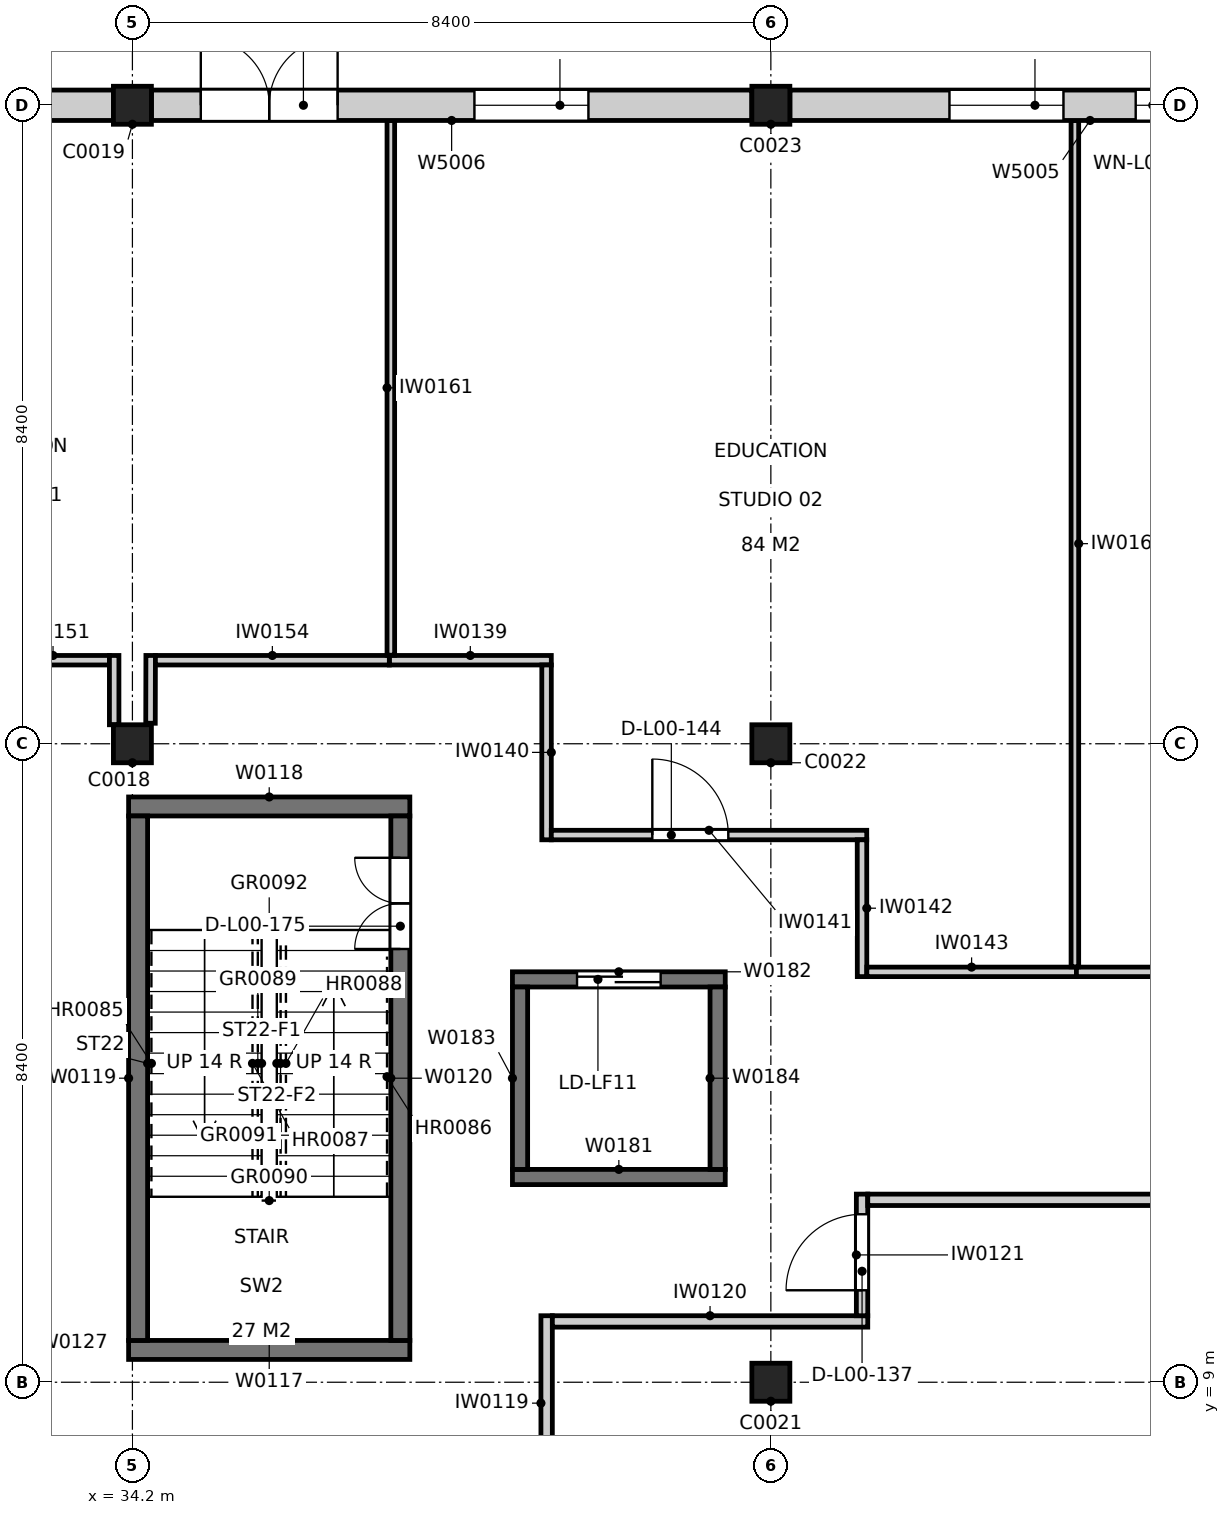
"""IFC4 building model, lengths in metres.
Left out: names, types, materials, properties, quantities, classifications, styles, units other than length and angle.
Written with IfcOpenShell. Run it as: python <this file> out.ifc"""

import sys

from ifc_helpers import new_model, si_unit, direction, frame, frame_2d, origin, origin_2d, place, context, subcontext, project, spatial, rectangle, extrude, element, fill, save


model = new_model("IFC4")
c1 = context("Model", 3, precision=1e-05, world=origin(), true_north=direction((0.0, 1.0)))
c2 = subcontext(c1, "Body", "Model", "MODEL_VIEW")
j1 = project(units=[si_unit("LENGTHUNIT", "METRE"), si_unit("PLANEANGLEUNIT", "RADIAN")], contexts=[c1])
p1 = place(None, origin())
s1 = spatial("IfcSite", under=j1, at=p1, CompositionType="ELEMENT")
p2 = place(p1, origin())
s2 = spatial("IfcBuilding", under=s1, at=p2, CompositionType="ELEMENT")
p3 = place(p2, origin())
s3 = spatial("IfcBuildingStorey", under=s2, at=p3, CompositionType="ELEMENT", Elevation=0.0)
for number, where, z_axis, x_axis in (
    (1, (34.2, 17.4, 0.0), (0.0, 0.0, 1.0), (1.0, 0.0, 0.0)),
    (2, (34.2, 25.8, 0.0), (0.0, 0.0, 1.0), (1.0, 0.0, 0.0)),
    (3, (42.6, 9.0, 0.0), (0.0, 0.0, 1.0), (1.0, 0.0, 0.0)),
    (4, (42.6, 17.4, 0.0), (0.0, 0.0, 1.0), (1.0, 0.0, 0.0)),
    (5, (42.6, 25.8, 0.0), (0.0, 0.0, 1.0), (1.0, 0.0, 0.0)),
):
    element("IfcColumn", number, at=place(p3, frame(where, z_axis=z_axis, x_axis=x_axis)), inside=s3, PredefinedType="COLUMN", context=c2, shape_type="SweptSolid", body=[
        extrude(rectangle(XDim=0.5, YDim=0.5, at=origin_2d()), origin(), (0.0, 0.0, 1.0), 4.8),
    ])
for number, where, z_axis, x_axis in (
    (6, (34.15, 9.425, 0.0), (0.0, 0.0, 1.0), (1.0, 0.0, 0.0)),
    (7, (34.15, 16.575, 0.0), (0.0, 0.0, 1.0), (1.0, 0.0, 0.0)),
):
    element("IfcWall", number, at=place(p3, frame(where, z_axis=z_axis, x_axis=x_axis)), inside=s3, PredefinedType="SOLIDWALL", context=c2, shape_type="SweptSolid", body=[
        extrude(rectangle(XDim=3.7, YDim=0.25, at=frame_2d((1.85, 0.0))), origin(), (0.0, 0.0, 1.0), 4.8),
    ])
p4 = place(p3, frame((34.275, 9.55, 0.0), z_axis=(0.0, 0.0, 1.0), x_axis=(0.0, 1.0, 0.0)))
e8 = element("IfcWall", 8, at=p4, inside=s3, PredefinedType="SOLIDWALL", context=c2, shape_type="SweptSolid", body=[
    extrude(rectangle(XDim=6.9, YDim=0.25, at=frame_2d((3.45, 0.0))), origin(), (0.0, 0.0, 1.0), 4.8),
])
p5 = place(p3, frame((37.725, 9.55, 0.0), z_axis=(0.0, 0.0, 1.0), x_axis=(0.0, 1.0, 0.0)))
e9 = element("IfcWall", 9, at=p5, inside=s3, PredefinedType="SOLIDWALL", context=c2, shape_type="SweptSolid", body=[
    extrude(rectangle(XDim=6.9, YDim=0.25, at=frame_2d((3.45, 0.0))), origin(), (0.0, 0.0, 1.0), 4.8),
])
p6 = place(p5, frame((5.15, 0.0, 0.0)))
e10 = element("IfcOpeningElement", 10, at=p6, cuts=e9, PredefinedType="OPENING", context=c2, shape_type="SweptSolid", body=[
    extrude(rectangle(XDim=1.2, YDim=2.1, at=frame_2d((0.6, 1.05))), frame((0.0, 0.135, 0.0), z_axis=(0.0, -1.0, 0.0), x_axis=(1.0, 0.0, 0.0)), (0.0, 0.0, 1.0), 0.27),
])
p7 = place(p3, frame((39.2, 11.7, 0.0), z_axis=(0.0, 0.0, 1.0), x_axis=(1.0, 0.0, 0.0)))
e11 = element("IfcWall", 11, at=p7, inside=s3, PredefinedType="SOLIDWALL", context=c2, shape_type="SweptSolid", body=[
    extrude(rectangle(XDim=2.8, YDim=0.2, at=frame_2d((1.4, 0.0))), origin(), (0.0, 0.0, 1.0), 4.8),
])
p8 = place(p3, frame((39.2, 14.3, 0.0), z_axis=(0.0, 0.0, 1.0), x_axis=(1.0, 0.0, 0.0)))
e12 = element("IfcWall", 12, at=p8, inside=s3, PredefinedType="SOLIDWALL", context=c2, shape_type="SweptSolid", body=[
    extrude(rectangle(XDim=2.8, YDim=0.2, at=frame_2d((1.4, 0.0))), origin(), (0.0, 0.0, 1.0), 4.8),
])
p9 = place(p8, frame((0.85, 0.0, 0.0)))
e13 = element("IfcOpeningElement", 13, at=p9, cuts=e12, PredefinedType="OPENING", context=c2, shape_type="SweptSolid", body=[
    extrude(rectangle(XDim=1.1, YDim=2.1, at=frame_2d((0.55, 1.05))), frame((0.0, 0.11, 0.0), z_axis=(0.0, -1.0, 0.0), x_axis=(1.0, 0.0, 0.0)), (0.0, 0.0, 1.0), 0.22),
])
for number, where, z_axis, x_axis in (
    (14, (39.3, 11.8, 0.0), (0.0, 0.0, 1.0), (0.0, 1.0, 0.0)),
    (15, (41.9, 11.8, 0.0), (0.0, 0.0, 1.0), (0.0, 1.0, 0.0)),
):
    element("IfcWall", number, at=place(p3, frame(where, z_axis=z_axis, x_axis=x_axis)), inside=s3, PredefinedType="SOLIDWALL", context=c2, shape_type="SweptSolid", body=[
        extrude(rectangle(XDim=2.4, YDim=0.2, at=frame_2d((1.2, 0.0))), origin(), (0.0, 0.0, 1.0), 4.8),
    ])
p10 = place(p3, frame((39.65, 7.575, 0.0), z_axis=(0.0, 0.0, 1.0), x_axis=(0.0, 1.0, 0.0)))
e16 = element("IfcWall", 16, at=p10, inside=s3, PredefinedType="PARTITIONING", context=c2, shape_type="SweptSolid", body=[
    extrude(rectangle(XDim=2.3, YDim=0.15, at=frame_2d((1.15, 0.0))), origin(), (0.0, 0.0, 1.0), 3.84),
])
p11 = place(p3, frame((39.725, 9.8, 0.0), z_axis=(0.0, 0.0, 1.0), x_axis=(1.0, 0.0, 0.0)))
e17 = element("IfcWall", 17, at=p11, inside=s3, PredefinedType="PARTITIONING", context=c2, shape_type="SweptSolid", body=[
    extrude(rectangle(XDim=4.15, YDim=0.15, at=frame_2d((2.075, 0.0))), origin(), (0.0, 0.0, 1.0), 3.84),
])
p12 = place(p3, frame((43.8, 9.875, 0.0), z_axis=(0.0, 0.0, 1.0), x_axis=(0.0, 1.0, 0.0)))
e18 = element("IfcWall", 18, at=p12, inside=s3, PredefinedType="PARTITIONING", context=c2, shape_type="SweptSolid", body=[
    extrude(rectangle(XDim=1.6, YDim=0.15, at=frame_2d((0.8, 0.0))), origin(), (0.0, 0.0, 1.0), 4.64),
])
p13 = place(p12, frame((0.335, 0.0, 0.0)))
e19 = element("IfcOpeningElement", 19, at=p13, cuts=e18, PredefinedType="OPENING", context=c2, shape_type="SweptSolid", body=[
    extrude(rectangle(XDim=1.0, YDim=2.1, at=frame_2d((0.5, 1.05))), frame((0.0, 0.085, 0.0), z_axis=(0.0, -1.0, 0.0), x_axis=(1.0, 0.0, 0.0)), (0.0, 0.0, 1.0), 0.17),
])
p14 = place(p3, frame((43.875, 11.4, 0.0), z_axis=(0.0, 0.0, 1.0), x_axis=(1.0, 0.0, 0.0)))
e20 = element("IfcWall", 20, at=p14, inside=s3, PredefinedType="PARTITIONING", context=c2, shape_type="SweptSolid", body=[
    extrude(rectangle(XDim=15.325, YDim=0.15, at=frame_2d((7.663, 0.0))), origin(), (0.0, 0.0, 1.0), 3.84),
])
p15 = place(p14, frame((6.89, 0.0, 0.0)))
e21 = element("IfcOpeningElement", 21, at=p15, cuts=e20, PredefinedType="OPENING", context=c2, shape_type="SweptSolid", body=[
    extrude(rectangle(XDim=1.0, YDim=2.1, at=frame_2d((0.5, 1.05))), frame((0.0, 0.085, 0.0), z_axis=(0.0, -1.0, 0.0), x_axis=(1.0, 0.0, 0.0)), (0.0, 0.0, 1.0), 0.17),
])
p16 = place(p3, frame((37.58, 18.499, 0.0), z_axis=(0.0, 0.0, 1.0), x_axis=(1.0, 0.0, 0.0)))
e22 = element("IfcWall", 22, at=p16, inside=s3, PredefinedType="PARTITIONING", context=c2, shape_type="SweptSolid", body=[
    extrude(rectangle(XDim=2.131, YDim=0.125, at=frame_2d((1.066, 0.0))), origin(), (0.0, 0.0, 1.0), 4.64),
])
p17 = place(p3, frame((39.649, 18.437, 0.0), z_axis=(0.0, 0.0, 1.0), x_axis=(0.0, -1.0, 0.0)))
e23 = element("IfcWall", 23, at=p17, inside=s3, PredefinedType="PARTITIONING", context=c2, shape_type="SweptSolid", body=[
    extrude(rectangle(XDim=2.3, YDim=0.125, at=frame_2d((1.15, 0.0))), origin(), (0.0, 0.0, 1.0), 3.84),
])
p18 = place(p3, frame((39.711, 16.199, 0.0), z_axis=(0.0, 0.0, 1.0), x_axis=(1.0, 0.0, 0.0)))
e24 = element("IfcWall", 24, at=p18, inside=s3, PredefinedType="PARTITIONING", context=c2, shape_type="SweptSolid", body=[
    extrude(rectangle(XDim=4.15, YDim=0.125, at=frame_2d((2.075, 0.0))), origin(), (0.0, 0.0, 1.0), 3.84),
])
p19 = place(p18, frame((1.329, 0.0, 0.0)))
e25 = element("IfcOpeningElement", 25, at=p19, cuts=e24, PredefinedType="OPENING", context=c2, shape_type="SweptSolid", body=[
    extrude(rectangle(XDim=1.0, YDim=2.1, at=frame_2d((0.5, 1.05))), frame((0.0, 0.073, 0.0), z_axis=(0.0, -1.0, 0.0), x_axis=(1.0, 0.0, 0.0)), (0.0, 0.0, 1.0), 0.145),
])
p20 = place(p3, frame((43.799, 16.136, 0.0), z_axis=(0.0, 0.0, 1.0), x_axis=(0.000542519926, -0.999999852836, 0.0)))
e26 = element("IfcWall", 26, at=p20, inside=s3, PredefinedType="PARTITIONING", context=c2, shape_type="SweptSolid", body=[
    extrude(rectangle(XDim=1.8, YDim=0.125, at=frame_2d((0.9, 0.0))), origin(), (0.0, 0.0, 1.0), 4.04),
])
p21 = place(p3, frame((43.863, 14.399, 0.0), z_axis=(0.0, 0.0, 1.0), x_axis=(1.0, 0.0, 0.0)))
e27 = element("IfcWall", 27, at=p21, inside=s3, PredefinedType="PARTITIONING", context=c2, shape_type="SweptSolid", body=[
    extrude(rectangle(XDim=2.758, YDim=0.125, at=frame_2d((1.379, 0.0))), origin(), (0.0, 0.0, 1.0), 4.04),
])
p22 = place(p3, frame((46.62, 14.399, 0.0), z_axis=(0.0, 0.0, 1.0), x_axis=(1.0, 0.0, 0.0)))
e28 = element("IfcWall", 28, at=p22, inside=s3, PredefinedType="PARTITIONING", context=c2, shape_type="SweptSolid", body=[
    extrude(rectangle(XDim=6.0, YDim=0.125, at=frame_2d((3.0, 0.0))), origin(), (0.0, 0.0, 1.0), 3.84),
])
p23 = place(p22, frame((2.521, 0.0, 0.0)))
e29 = element("IfcOpeningElement", 29, at=p23, cuts=e28, PredefinedType="OPENING", context=c2, shape_type="SweptSolid", body=[
    extrude(rectangle(XDim=0.9, YDim=2.1, at=frame_2d((0.45, 1.05))), frame((0.0, 0.073, 0.0), z_axis=(0.0, -1.0, 0.0), x_axis=(1.0, 0.0, 0.0)), (0.0, 0.0, 1.0), 0.145),
])
p24 = place(p3, frame((32.414, 18.499, 0.0), z_axis=(0.0, 0.0, 1.0), x_axis=(1.0, 0.0, 0.0)))
e30 = element("IfcWall", 30, at=p24, inside=s3, PredefinedType="PARTITIONING", context=c2, shape_type="SweptSolid", body=[
    extrude(rectangle(XDim=1.484, YDim=0.125, at=frame_2d((0.742, 0.0))), origin(), (0.0, 0.0, 1.0), 4.64),
])
p25 = place(p3, frame((33.96, 18.562, 0.0), z_axis=(0.0, 0.0, 1.0), x_axis=(0.0, -1.0, 0.0)))
e31 = element("IfcWall", 31, at=p25, inside=s3, PredefinedType="PARTITIONING", context=c2, shape_type="SweptSolid", body=[
    extrude(rectangle(XDim=0.912, YDim=0.125, at=frame_2d((0.456, 0.0))), origin(), (0.0, 0.0, 1.0), 3.84),
])
p26 = place(p3, frame((34.438, 17.67, 0.0), z_axis=(0.0, 0.0, 1.0), x_axis=(0.002464395583, 0.999996963373, 0.0)))
e32 = element("IfcWall", 32, at=p26, inside=s3, PredefinedType="PARTITIONING", context=c2, shape_type="SweptSolid", body=[
    extrude(rectangle(XDim=0.892, YDim=0.125, at=frame_2d((0.446, 0.0))), origin(), (0.0, 0.0, 1.0), 3.84),
])
p27 = place(p3, frame((34.502, 18.499, 0.0), z_axis=(0.0, 0.0, 1.0), x_axis=(1.0, 0.0, 0.0)))
e33 = element("IfcWall", 33, at=p27, inside=s3, PredefinedType="PARTITIONING", context=c2, shape_type="SweptSolid", body=[
    extrude(rectangle(XDim=3.078, YDim=0.125, at=frame_2d((1.539, 0.0))), origin(), (0.0, 0.0, 1.0), 4.64),
])
p28 = place(p3, frame((46.6, 25.6, 0.0), z_axis=(0.0, 0.0, 1.0), x_axis=(0.0, -1.0, 0.0)))
e34 = element("IfcWall", 34, at=p28, inside=s3, PredefinedType="PARTITIONING", context=c2, shape_type="SweptSolid", body=[
    extrude(rectangle(XDim=11.135, YDim=0.1, at=frame_2d((5.567, 0.0))), origin(), (0.0, 0.0, 1.0), 3.84),
])
p29 = place(p3, frame((37.6, 18.565, 0.0), z_axis=(0.0, 0.0, 1.0), x_axis=(0.0, 1.0, 0.0)))
e35 = element("IfcWall", 35, at=p29, inside=s3, PredefinedType="PARTITIONING", context=c2, shape_type="SweptSolid", body=[
    extrude(rectangle(XDim=7.035, YDim=0.1, at=frame_2d((3.518, 0.0))), origin(), (0.0, 0.0, 1.0), 4.04),
])
p30 = place(p3, frame((50.75, 25.8, 0.0), z_axis=(0.0, 0.0, 1.0), x_axis=(-1.0, 0.0, 0.0)))
e36 = element("IfcWall", 36, at=p30, inside=s3, PredefinedType="SOLIDWALL", context=c2, shape_type="SweptSolid", body=[
    extrude(rectangle(XDim=7.9, YDim=0.4, at=frame_2d((3.95, 0.0))), origin(), (0.0, 0.0, 1.0), 3.84),
])
p31 = place(p30, frame((4.3, 0.0, 0.9)))
e37 = element("IfcOpeningElement", 37, at=p31, cuts=e36, PredefinedType="OPENING", context=c2, shape_type="SweptSolid", body=[
    extrude(rectangle(XDim=1.5, YDim=1.5, at=frame_2d((0.75, 0.75))), frame((0.0, 0.21, 0.0), z_axis=(0.0, -1.0, 0.0), x_axis=(1.0, 0.0, 0.0)), (0.0, 0.0, 1.0), 0.42),
])
p32 = place(p30, frame((2.45, 0.0, 1.8)))
e38 = element("IfcOpeningElement", 38, at=p32, cuts=e36, PredefinedType="OPENING", context=c2, shape_type="SweptSolid", body=[
    extrude(rectangle(XDim=0.9, YDim=0.6, at=frame_2d((0.45, 0.3))), frame((0.0, 0.21, 0.0), z_axis=(0.0, -1.0, 0.0), x_axis=(1.0, 0.0, 0.0)), (0.0, 0.0, 1.0), 0.42),
])
p33 = place(p30, frame((0.35, 0.0, 1.8)))
e39 = element("IfcOpeningElement", 39, at=p33, cuts=e36, PredefinedType="OPENING", context=c2, shape_type="SweptSolid", body=[
    extrude(rectangle(XDim=0.9, YDim=0.6, at=frame_2d((0.45, 0.3))), frame((0.0, 0.21, 0.0), z_axis=(0.0, -1.0, 0.0), x_axis=(1.0, 0.0, 0.0)), (0.0, 0.0, 1.0), 0.42),
])
p34 = place(p3, frame((42.35, 25.8, 0.0), z_axis=(0.0, 0.0, 1.0), x_axis=(-1.0, 0.0, 0.0)))
e40 = element("IfcWall", 40, at=p34, inside=s3, PredefinedType="SOLIDWALL", context=c2, shape_type="SweptSolid", body=[
    extrude(rectangle(XDim=7.9, YDim=0.4, at=frame_2d((3.95, 0.0))), origin(), (0.0, 0.0, 1.0), 3.84),
])
p35 = place(p34, frame((7.25, 0.0, 0.0), z_axis=(0.0, 0.0, 1.0), x_axis=(-1.0, 0.0, 0.0)))
e41 = element("IfcOpeningElement", 41, at=p35, cuts=e40, PredefinedType="OPENING", context=c2, shape_type="SweptSolid", body=[
    extrude(rectangle(XDim=1.8, YDim=2.1, at=frame_2d((0.9, 1.05))), frame((0.0, 0.21, 0.0), z_axis=(0.0, -1.0, 0.0), x_axis=(1.0, 0.0, 0.0)), (0.0, 0.0, 1.0), 0.42),
])
p36 = place(p34, frame((2.15, 0.0, 0.9)))
e42 = element("IfcOpeningElement", 42, at=p36, cuts=e40, PredefinedType="OPENING", context=c2, shape_type="SweptSolid", body=[
    extrude(rectangle(XDim=1.5, YDim=1.5, at=frame_2d((0.75, 0.75))), frame((0.0, 0.21, 0.0), z_axis=(0.0, -1.0, 0.0), x_axis=(1.0, 0.0, 0.0)), (0.0, 0.0, 1.0), 0.42),
])
p37 = place(p3, frame((33.95, 25.8, 0.0), z_axis=(0.0, 0.0, 1.0), x_axis=(-1.0, 0.0, 0.0)))
e43 = element("IfcWall", 43, at=p37, inside=s3, PredefinedType="SOLIDWALL", context=c2, shape_type="SweptSolid", body=[
    extrude(rectangle(XDim=7.9, YDim=0.4, at=frame_2d((3.95, 0.0))), origin(), (0.0, 0.0, 1.0), 3.84),
])
p38 = place(p37, frame((6.65, 0.0, 1.5)))
e44 = element("IfcOpeningElement", 44, at=p38, cuts=e43, PredefinedType="OPENING", context=c2, shape_type="SweptSolid", body=[
    extrude(rectangle(XDim=0.9, YDim=1.2, at=frame_2d((0.45, 0.6))), frame((0.0, 0.21, 0.0), z_axis=(0.0, -1.0, 0.0), x_axis=(1.0, 0.0, 0.0)), (0.0, 0.0, 1.0), 0.42),
])
p39 = place(p37, frame((3.62, 0.0, 0.9)))
e45 = element("IfcOpeningElement", 45, at=p39, cuts=e43, PredefinedType="OPENING", context=c2, shape_type="SweptSolid", body=[
    extrude(rectangle(XDim=1.5, YDim=1.5, at=frame_2d((0.75, 0.75))), frame((0.0, 0.21, 0.0), z_axis=(0.0, -1.0, 0.0), x_axis=(1.0, 0.0, 0.0)), (0.0, 0.0, 1.0), 0.42),
])
p40 = place(p37, frame((1.87, 0.0, 0.9)))
e46 = element("IfcOpeningElement", 46, at=p40, cuts=e43, PredefinedType="OPENING", context=c2, shape_type="SweptSolid", body=[
    extrude(rectangle(XDim=1.5, YDim=1.5, at=frame_2d((0.75, 0.75))), frame((0.0, 0.21, 0.0), z_axis=(0.0, -1.0, 0.0), x_axis=(1.0, 0.0, 0.0)), (0.0, 0.0, 1.0), 0.42),
])
p41 = place(p13, origin())
e47 = element("IfcDoor", 47, at=p41, inside=s3, OperationType="SINGLE_SWING_LEFT", PredefinedType="DOOR", context=c2, shape_type="SweptSolid", body=[
    extrude(rectangle(XDim=1.0, YDim=2.1, at=frame_2d((0.5, 1.05))), frame((0.0, 0.025, 0.0), z_axis=(0.0, -1.0, 0.0), x_axis=(1.0, 0.0, 0.0)), (0.0, 0.0, 1.0), 0.05),
])
fill(e19, e47)
p42 = place(p19, origin())
e48 = element("IfcDoor", 48, at=p42, inside=s3, OperationType="SINGLE_SWING_LEFT", PredefinedType="DOOR", context=c2, shape_type="SweptSolid", body=[
    extrude(rectangle(XDim=1.0, YDim=2.1, at=frame_2d((0.5, 1.05))), frame((0.0, 0.025, 0.0), z_axis=(0.0, -1.0, 0.0), x_axis=(1.0, 0.0, 0.0)), (0.0, 0.0, 1.0), 0.05),
])
fill(e25, e48)
p43 = place(p6, origin())
e49 = element("IfcDoor", 49, at=p43, inside=s3, OperationType="DOUBLE_DOOR_SINGLE_SWING", PredefinedType="DOOR", context=c2, shape_type="SweptSolid", body=[
    extrude(rectangle(XDim=1.2, YDim=2.1, at=frame_2d((0.6, 1.05))), frame((0.0, 0.025, 0.0), z_axis=(0.0, -1.0, 0.0), x_axis=(1.0, 0.0, 0.0)), (0.0, 0.0, 1.0), 0.05),
])
fill(e10, e49)
p44 = place(p35, origin())
e50 = element("IfcDoor", 50, at=p44, inside=s3, OperationType="DOUBLE_DOOR_SINGLE_SWING", PredefinedType="DOOR", context=c2, shape_type="SweptSolid", body=[
    extrude(rectangle(XDim=1.8, YDim=2.1, at=frame_2d((0.9, 1.05))), frame((0.0, 0.025, 0.0), z_axis=(0.0, -1.0, 0.0), x_axis=(1.0, 0.0, 0.0)), (0.0, 0.0, 1.0), 0.05),
])
fill(e41, e50)
p45 = place(p31, origin())
e51 = element("IfcWindow", 51, at=p45, inside=s3, PartitioningType="DOUBLE_PANEL_VERTICAL", PredefinedType="WINDOW", context=c2, shape_type="SweptSolid", body=[
    extrude(rectangle(XDim=1.5, YDim=1.5, at=frame_2d((0.75, 0.75))), frame((0.0, 0.15, 0.0), z_axis=(0.0, -1.0, 0.0), x_axis=(1.0, 0.0, 0.0)), (0.0, 0.0, 1.0), 0.06),
])
fill(e37, e51)
p46 = place(p32, origin())
e52 = element("IfcWindow", 52, at=p46, inside=s3, PartitioningType="SINGLE_PANEL", PredefinedType="WINDOW", context=c2, shape_type="SweptSolid", body=[
    extrude(rectangle(XDim=0.9, YDim=0.6, at=frame_2d((0.45, 0.3))), frame((0.0, 0.06, 0.0), z_axis=(0.0, -1.0, 0.0), x_axis=(1.0, 0.0, 0.0)), (0.0, 0.0, 1.0), 0.06),
])
fill(e38, e52)
p47 = place(p36, origin())
e53 = element("IfcWindow", 53, at=p47, inside=s3, PartitioningType="DOUBLE_PANEL_VERTICAL", PredefinedType="WINDOW", context=c2, shape_type="SweptSolid", body=[
    extrude(rectangle(XDim=1.5, YDim=1.5, at=frame_2d((0.75, 0.75))), frame((0.0, 0.15, 0.0), z_axis=(0.0, -1.0, 0.0), x_axis=(1.0, 0.0, 0.0)), (0.0, 0.0, 1.0), 0.06),
])
fill(e42, e53)
p48 = place(p9, origin())
e54 = element("IfcDoor", 54, at=p48, inside=s3, OperationType="SLIDING_TO_LEFT", PredefinedType="DOOR", context=c2, shape_type="SweptSolid", body=[
    extrude(rectangle(XDim=1.1, YDim=2.1, at=frame_2d((0.55, 1.05))), frame((0.0, 0.025, 0.0), z_axis=(0.0, -1.0, 0.0), x_axis=(1.0, 0.0, 0.0)), (0.0, 0.0, 1.0), 0.05),
])
fill(e13, e54)
save(model, sys.argv[1])
